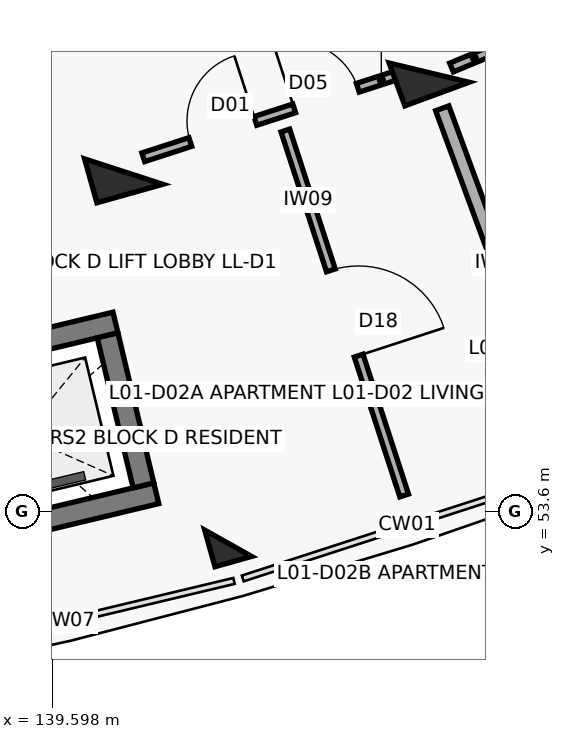
"""IFC4 building model, lengths in metres.
Left out: names, types, materials, properties, quantities, classifications, styles, units other than length and angle.
Written with IfcOpenShell. Run it as: python <this file> out.ifc"""

import sys

from ifc_helpers import new_model, si_unit, direction, frame, frame_2d, origin, origin_2d, place, context, subcontext, project, spatial, rectangle, extrude, element, fill, save


model = new_model("IFC4")
c1 = context("Model", 3, precision=1e-05, world=origin(), true_north=direction((0.0, 1.0)))
c2 = subcontext(c1, "Body", "Model", "MODEL_VIEW")
j1 = project(units=[si_unit("LENGTHUNIT", "METRE"), si_unit("PLANEANGLEUNIT", "RADIAN")], contexts=[c1])
p1 = place(None, origin())
s1 = spatial("IfcSite", under=j1, at=p1, CompositionType="ELEMENT")
p2 = place(p1, origin())
s2 = spatial("IfcBuilding", under=s1, at=p2, CompositionType="ELEMENT")
p3 = place(p2, frame((0.0, 0.0, 4.5)))
s3 = spatial("IfcBuildingStorey", under=s2, at=p3, CompositionType="ELEMENT", Elevation=4.5)
p4 = place(p3, frame((140.538, 58.067, 0.0), z_axis=(0.0, 0.0, 1.0), x_axis=(0.270600445976, -0.962691746426, 0.0)))
e1 = element("IfcColumn", 1, at=p4, inside=s3, PredefinedType="COLUMN", context=c2, shape_type="SweptSolid", body=[
    extrude(rectangle(XDim=0.6, YDim=0.9, at=origin_2d()), origin(), (0.0, 0.0, 1.0), 3.6),
])
p5 = place(p3, frame((141.913, 53.177, 0.0), z_axis=(0.0, 0.0, 1.0), x_axis=(0.270600445976, -0.962691746426, 0.0)))
e2 = element("IfcColumn", 2, at=p5, inside=s3, PredefinedType="COLUMN", context=c2, shape_type="SweptSolid", body=[
    extrude(rectangle(XDim=0.5, YDim=0.5, at=origin_2d()), origin(), (0.0, 0.0, 1.0), 3.6),
])
p6 = place(p3, frame((144.557, 59.369, 0.0), z_axis=(0.0, 0.0, 1.0), x_axis=(0.345298198999, -0.93849302276, 0.0)))
e3 = element("IfcColumn", 3, at=p6, inside=s3, PredefinedType="COLUMN", context=c2, shape_type="SweptSolid", body=[
    extrude(rectangle(XDim=0.6, YDim=0.9, at=origin_2d()), origin(), (0.0, 0.0, 1.0), 3.6),
])
p7 = place(p3, frame((137.425, 55.362, 0.0), z_axis=(0.0, 0.0, 1.0), x_axis=(0.972573452388, 0.232595958069, 0.0)))
e4 = element("IfcWall", 4, at=p7, inside=s3, PredefinedType="SHEAR", context=c2, shape_type="SweptSolid", body=[
    extrude(rectangle(XDim=3.09, YDim=0.28, at=frame_2d((1.545, 0.0))), origin(), (0.0, 0.0, 1.0), 3.6),
])
p8 = place(p7, frame((0.995, 0.0, 0.0)))
e5 = element("IfcOpeningElement", 5, at=p8, cuts=e4, PredefinedType="OPENING", context=c2, shape_type="SweptSolid", body=[
    extrude(rectangle(XDim=1.1, YDim=2.15, at=frame_2d((0.55, 1.075))), frame((0.0, 0.15, 0.0), z_axis=(0.0, -1.0, 0.0), x_axis=(1.0, 0.0, 0.0)), (0.0, 0.0, 1.0), 0.3),
])
p9 = place(p3, frame((137.962, 53.116, 0.0), z_axis=(0.0, 0.0, 1.0), x_axis=(0.972573452388, 0.232595958069, 0.0)))
e6 = element("IfcWall", 6, at=p9, inside=s3, PredefinedType="SHEAR", context=c2, shape_type="SweptSolid", body=[
    extrude(rectangle(XDim=3.09, YDim=0.28, at=frame_2d((1.545, 0.0))), origin(), (0.0, 0.0, 1.0), 3.6),
])
p10 = place(p3, frame((140.326, 55.912, 0.0), z_axis=(0.0, 0.0, 1.0), x_axis=(0.232590524316, -0.972574751882, 0.0)))
e7 = element("IfcWall", 7, at=p10, inside=s3, PredefinedType="SHEAR", context=c2, shape_type="SweptSolid", body=[
    extrude(rectangle(XDim=2.03, YDim=0.28, at=frame_2d((1.015, 0.0))), origin(), (0.0, 0.0, 1.0), 3.6),
])
p11 = place(p3, frame((140.797, 58.256, 0.0), z_axis=(0.0, 0.0, 1.0), x_axis=(0.951329312261, 0.308176150331, 0.0)))
e8 = element("IfcWall", 8, at=p11, inside=s3, PredefinedType="PARTITIONING", context=c2, shape_type="SweptSolid", body=[
    extrude(rectangle(XDim=3.616, YDim=0.12, at=frame_2d((1.808, 0.0))), origin(), (0.0, 0.0, 1.0), 2.58),
])
p12 = place(p11, frame((0.65, 0.0, 0.0)))
e9 = element("IfcOpeningElement", 9, at=p12, cuts=e8, PredefinedType="OPENING", context=c2, shape_type="SweptSolid", body=[
    extrude(rectangle(XDim=0.9, YDim=2.1, at=frame_2d((0.45, 1.05))), frame((0.0, 0.07, 0.0), z_axis=(0.0, -1.0, 0.0), x_axis=(1.0, 0.0, 0.0)), (0.0, 0.0, 1.0), 0.14),
])
p13 = place(p11, frame((2.086, 0.0, 0.0)))
e10 = element("IfcOpeningElement", 10, at=p13, cuts=e8, PredefinedType="OPENING", context=c2, shape_type="SweptSolid", body=[
    extrude(rectangle(XDim=0.88, YDim=2.1, at=frame_2d((0.44, 1.05))), frame((0.0, 0.07, 0.0), z_axis=(0.0, -1.0, 0.0), x_axis=(1.0, 0.0, 0.0)), (0.0, 0.0, 1.0), 0.14),
])
p14 = place(p3, frame((142.665, 58.608, 0.0), z_axis=(0.0, 0.0, 1.0), x_axis=(0.309592146544, -0.950869445717, 0.0)))
e11 = element("IfcWall", 11, at=p14, inside=s3, PredefinedType="PARTITIONING", context=c2, shape_type="SweptSolid", body=[
    extrude(rectangle(XDim=5.05, YDim=0.12, at=frame_2d((2.525, 0.0))), origin(), (0.0, 0.0, 1.0), 2.58),
])
p15 = place(p14, frame((1.935, 0.0, 0.0)))
e12 = element("IfcOpeningElement", 12, at=p15, cuts=e11, PredefinedType="OPENING", context=c2, shape_type="SweptSolid", body=[
    extrude(rectangle(XDim=1.18, YDim=2.1, at=frame_2d((0.59, 1.05))), frame((0.0, 0.07, 0.0), z_axis=(0.0, -1.0, 0.0), x_axis=(1.0, 0.0, 0.0)), (0.0, 0.0, 1.0), 0.14),
])
p16 = place(p3, frame((144.852, 59.437, 0.0), z_axis=(0.0, 0.0, 1.0), x_axis=(0.924217547919, 0.381866369453, 0.0)))
e13 = element("IfcWall", 13, at=p16, inside=s3, PredefinedType="PARTITIONING", context=c2, shape_type="SweptSolid", body=[
    extrude(rectangle(XDim=3.628, YDim=0.125, at=frame_2d((1.814, 0.0))), origin(), (0.0, 0.0, 1.0), 2.58),
])
p17 = place(p16, frame((0.65, 0.0, 0.0)))
e14 = element("IfcOpeningElement", 14, at=p17, cuts=e13, PredefinedType="OPENING", context=c2, shape_type="SweptSolid", body=[
    extrude(rectangle(XDim=0.9, YDim=2.1, at=frame_2d((0.45, 1.05))), frame((0.0, 0.073, 0.0), z_axis=(0.0, -1.0, 0.0), x_axis=(1.0, 0.0, 0.0)), (0.0, 0.0, 1.0), 0.145),
])
p18 = place(p16, frame((2.098, 0.0, 0.0)))
e15 = element("IfcOpeningElement", 15, at=p18, cuts=e13, PredefinedType="OPENING", context=c2, shape_type="SweptSolid", body=[
    extrude(rectangle(XDim=0.88, YDim=2.1, at=frame_2d((0.44, 1.05))), frame((0.0, 0.073, 0.0), z_axis=(0.0, -1.0, 0.0), x_axis=(1.0, 0.0, 0.0)), (0.0, 0.0, 1.0), 0.145),
])
p19 = place(p3, frame((144.73, 58.9, 0.0), z_axis=(0.0, 0.0, 1.0), x_axis=(0.345273579683, -0.938502080537, 0.0)))
e16 = element("IfcWall", 16, at=p19, inside=s3, PredefinedType="SOLIDWALL", context=c2, shape_type="SweptSolid", body=[
    extrude(rectangle(XDim=4.35, YDim=0.185, at=frame_2d((2.175, 0.0))), origin(), (0.0, 0.0, 1.0), 2.58),
])
p20 = place(p12, origin())
e17 = element("IfcDoor", 17, at=p20, inside=s3, OperationType="SINGLE_SWING_RIGHT", PredefinedType="DOOR", context=c2, shape_type="SweptSolid", body=[
    extrude(rectangle(XDim=0.9, YDim=2.1, at=frame_2d((0.45, 1.05))), frame((0.0, 0.025, 0.0), z_axis=(0.0, -1.0, 0.0), x_axis=(1.0, 0.0, 0.0)), (0.0, 0.0, 1.0), 0.05),
])
fill(e9, e17)
p21 = place(p13, origin())
e18 = element("IfcDoor", 18, at=p21, inside=s3, OperationType="SINGLE_SWING_LEFT", PredefinedType="DOOR", context=c2, shape_type="SweptSolid", body=[
    extrude(rectangle(XDim=0.88, YDim=2.1, at=frame_2d((0.44, 1.05))), frame((0.0, 0.025, 0.0), z_axis=(0.0, -1.0, 0.0), x_axis=(1.0, 0.0, 0.0)), (0.0, 0.0, 1.0), 0.05),
])
fill(e10, e18)
p22 = place(p15, origin())
e19 = element("IfcDoor", 19, at=p22, inside=s3, OperationType="SINGLE_SWING_RIGHT", PredefinedType="DOOR", context=c2, shape_type="SweptSolid", body=[
    extrude(rectangle(XDim=1.18, YDim=2.1, at=frame_2d((0.59, 1.05))), frame((0.0, 0.025, 0.0), z_axis=(0.0, -1.0, 0.0), x_axis=(1.0, 0.0, 0.0)), (0.0, 0.0, 1.0), 0.05),
])
fill(e12, e19)
save(model, sys.argv[1])
